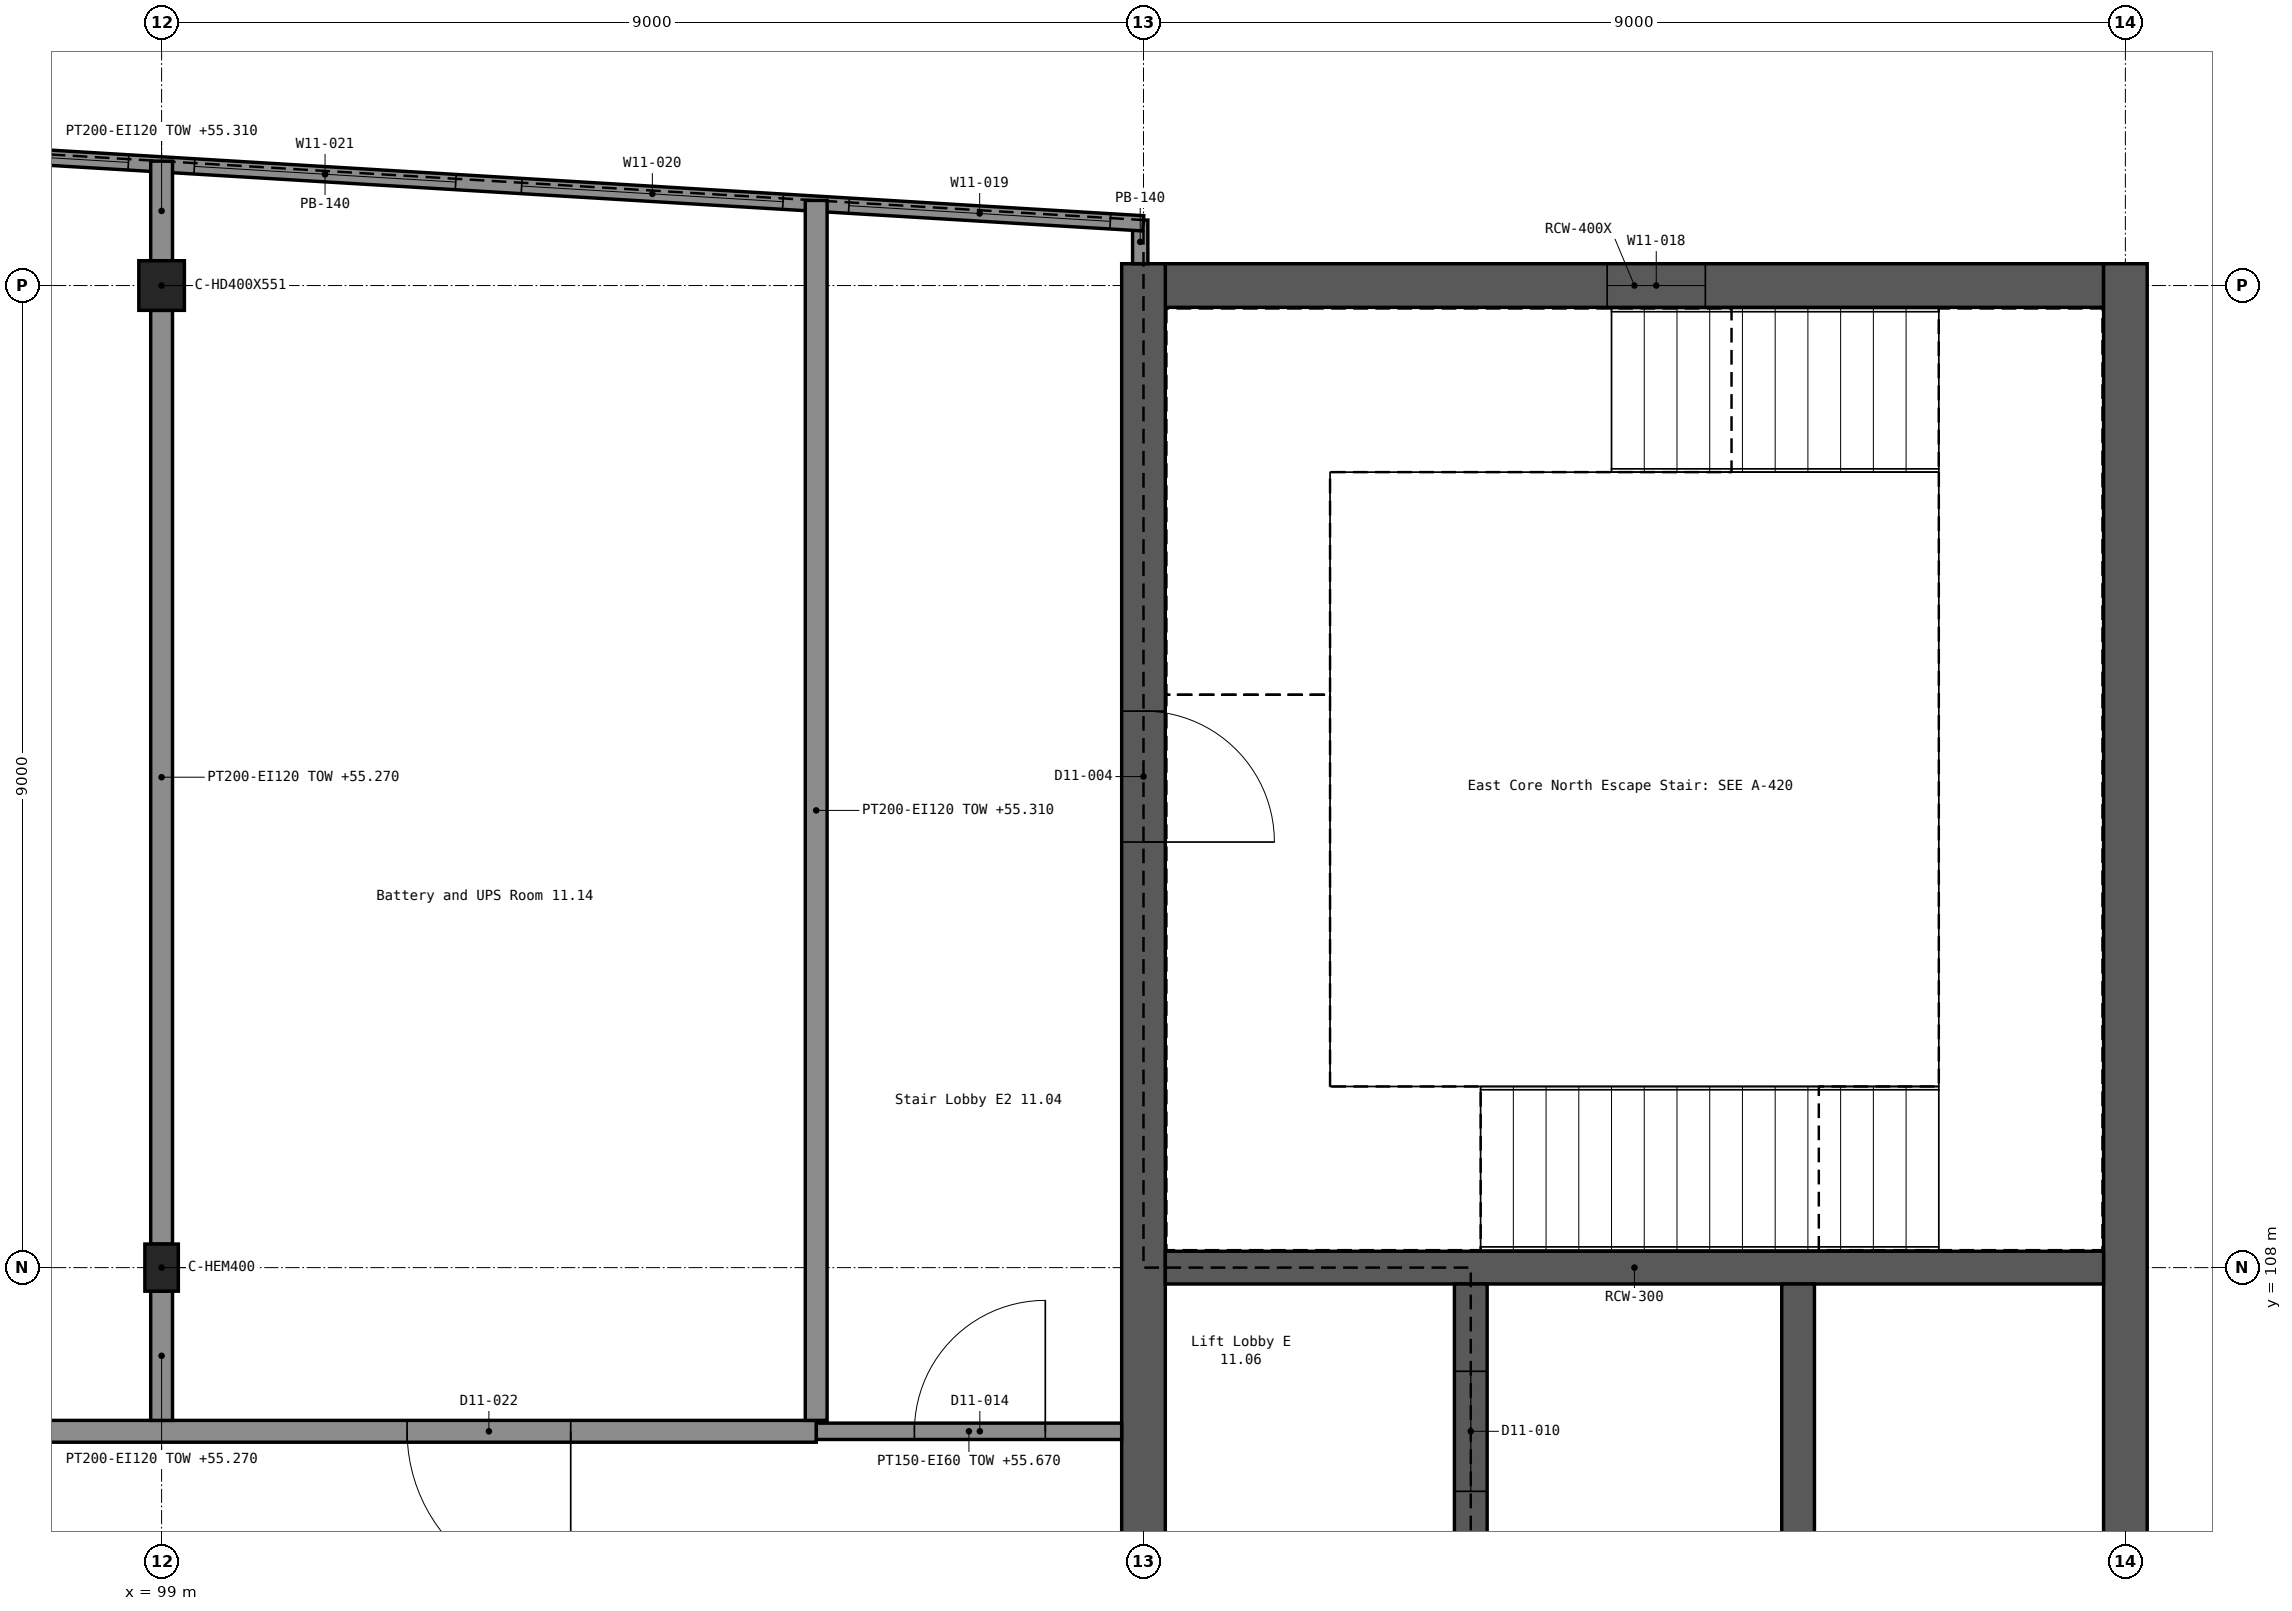
"""IFC4 building model, lengths in metres.
Left out: names, types, materials, properties, quantities, classifications, styles, units other than length and angle.
Written with IfcOpenShell. Run it as: python <this file> out.ifc"""

import sys

from ifc_helpers import new_model, si_unit, direction, frame, frame_2d, origin, origin_2d, place, context, subcontext, project, spatial, rectangle, i_section, extrude, element, fill, save


model = new_model("IFC4")
c1 = context("Model", 3, precision=1e-05, world=origin(), true_north=direction((0.0, 1.0)))
c2 = subcontext(c1, "Body", "Model", "MODEL_VIEW")
j1 = project(units=[si_unit("LENGTHUNIT", "METRE"), si_unit("PLANEANGLEUNIT", "RADIAN")], contexts=[c1])
p1 = place(None, origin())
s1 = spatial("IfcSite", under=j1, at=p1, CompositionType="ELEMENT")
p2 = place(p1, origin())
s2 = spatial("IfcBuilding", under=s1, at=p2, CompositionType="ELEMENT")
p3 = place(p2, frame((0.0, 0.0, 51.9)))
s3 = spatial("IfcBuildingStorey", under=s2, at=p3, CompositionType="ELEMENT", Elevation=51.9)
p4 = place(p3, frame((108.2, 117.0, 0.0), z_axis=(0.0, 0.0, 1.0), x_axis=(1.0, 0.0, 0.0)))
e1 = element("IfcWall", 1, at=p4, inside=s3, PredefinedType="SHEAR", context=c2, shape_type="SweptSolid", body=[
    extrude(rectangle(XDim=8.6, YDim=0.4, at=frame_2d((4.3, 0.0))), origin(), (0.0, 0.0, 1.0), 3.9),
])
p5 = place(p4, frame((4.05, 0.0, 1.2)))
e2 = element("IfcOpeningElement", 2, at=p5, cuts=e1, PredefinedType="OPENING", context=c2, shape_type="SweptSolid", body=[
    extrude(rectangle(XDim=0.9, YDim=1.5, at=frame_2d((0.45, 0.75))), frame((0.0, 0.211, 0.0), z_axis=(0.0, -1.0, 0.0), x_axis=(1.0, 0.0, 0.0)), (0.0, 0.0, 1.0), 0.422),
])
p6 = place(p3, frame((108.0, 89.8, 0.0), z_axis=(0.0, 0.0, 1.0), x_axis=(0.0, 1.0, 0.0)))
e3 = element("IfcWall", 3, at=p6, inside=s3, PredefinedType="SHEAR", context=c2, shape_type="SweptSolid", body=[
    extrude(rectangle(XDim=27.4, YDim=0.4, at=frame_2d((13.7, 0.0))), origin(), (0.0, 0.0, 1.0), 3.9),
])
p7 = place(p6, frame((4.1, 0.0, 0.0)))
e4 = element("IfcOpeningElement", 4, at=p7, cuts=e3, PredefinedType="OPENING", context=c2, shape_type="SweptSolid", body=[
    extrude(rectangle(XDim=1.2, YDim=2.1, at=frame_2d((0.6, 1.05))), frame((0.0, 0.211, 0.0), z_axis=(0.0, -1.0, 0.0), x_axis=(1.0, 0.0, 0.0)), (0.0, 0.0, 1.0), 0.422),
])
p8 = place(p6, frame((22.1, 0.0, 0.0)))
e5 = element("IfcOpeningElement", 5, at=p8, cuts=e3, PredefinedType="OPENING", context=c2, shape_type="SweptSolid", body=[
    extrude(rectangle(XDim=1.2, YDim=2.1, at=frame_2d((0.6, 1.05))), frame((0.0, 0.211, 0.0), z_axis=(0.0, -1.0, 0.0), x_axis=(1.0, 0.0, 0.0)), (0.0, 0.0, 1.0), 0.422),
])
p9 = place(p6, frame((12.5, 0.0, 0.0)))
e6 = element("IfcOpeningElement", 6, at=p9, cuts=e3, PredefinedType="OPENING", context=c2, shape_type="SweptSolid", body=[
    extrude(rectangle(XDim=2.0, YDim=2.1, at=frame_2d((1.0, 1.05))), frame((0.0, 0.211, 0.0), z_axis=(0.0, -1.0, 0.0), x_axis=(1.0, 0.0, 0.0)), (0.0, 0.0, 1.0), 0.422),
])
p10 = place(p3, frame((117.0, 89.8, 0.0), z_axis=(0.0, 0.0, 1.0), x_axis=(0.0, 1.0, 0.0)))
e7 = element("IfcWall", 7, at=p10, inside=s3, PredefinedType="SHEAR", context=c2, shape_type="SweptSolid", body=[
    extrude(rectangle(XDim=27.4, YDim=0.4, at=frame_2d((13.7, 0.0))), origin(), (0.0, 0.0, 1.0), 3.9),
])
p11 = place(p3, frame((108.2, 108.0, 0.0), z_axis=(0.0, 0.0, 1.0), x_axis=(1.0, 0.0, 0.0)))
e8 = element("IfcWall", 8, at=p11, inside=s3, PredefinedType="SHEAR", context=c2, shape_type="SweptSolid", body=[
    extrude(rectangle(XDim=8.6, YDim=0.3, at=frame_2d((4.3, 0.0))), origin(), (0.0, 0.0, 1.0), 3.9),
])
p12 = place(p3, frame((111.0, 99.15, 0.0), z_axis=(0.0, 0.0, 1.0), x_axis=(0.0, 1.0, 0.0)))
e9 = element("IfcWall", 9, at=p12, inside=s3, PredefinedType="SHEAR", context=c2, shape_type="SweptSolid", body=[
    extrude(rectangle(XDim=8.7, YDim=0.3, at=frame_2d((4.35, 0.0))), origin(), (0.0, 0.0, 1.0), 3.9),
])
p13 = place(p12, frame((0.8, 0.0, 0.0)))
e10 = element("IfcOpeningElement", 10, at=p13, cuts=e9, PredefinedType="OPENING", context=c2, shape_type="SweptSolid", body=[
    extrude(rectangle(XDim=1.1, YDim=2.1, at=frame_2d((0.55, 1.05))), frame((0.0, 0.161, 0.0), z_axis=(0.0, -1.0, 0.0), x_axis=(1.0, 0.0, 0.0)), (0.0, 0.0, 1.0), 0.322),
])
p14 = place(p12, frame((3.8, 0.0, 0.0)))
e11 = element("IfcOpeningElement", 11, at=p14, cuts=e9, PredefinedType="OPENING", context=c2, shape_type="SweptSolid", body=[
    extrude(rectangle(XDim=1.1, YDim=2.1, at=frame_2d((0.55, 1.05))), frame((0.0, 0.161, 0.0), z_axis=(0.0, -1.0, 0.0), x_axis=(1.0, 0.0, 0.0)), (0.0, 0.0, 1.0), 0.322),
])
p15 = place(p12, frame((6.8, 0.0, 0.0)))
e12 = element("IfcOpeningElement", 12, at=p15, cuts=e9, PredefinedType="OPENING", context=c2, shape_type="SweptSolid", body=[
    extrude(rectangle(XDim=1.1, YDim=2.1, at=frame_2d((0.55, 1.05))), frame((0.0, 0.161, 0.0), z_axis=(0.0, -1.0, 0.0), x_axis=(1.0, 0.0, 0.0)), (0.0, 0.0, 1.0), 0.322),
])
p16 = place(p3, frame((114.0, 99.15, 0.0), z_axis=(0.0, 0.0, 1.0), x_axis=(0.0, 1.0, 0.0)))
e13 = element("IfcWall", 13, at=p16, inside=s3, PredefinedType="SHEAR", context=c2, shape_type="SweptSolid", body=[
    extrude(rectangle(XDim=8.7, YDim=0.3, at=frame_2d((4.35, 0.0))), origin(), (0.0, 0.0, 1.0), 3.9),
])
p17 = place(p3, frame((99.0, 108.0, 0.0), z_axis=(0.0, 0.0, 1.0), x_axis=(1.0, 0.0, 0.0)))
e14 = element("IfcColumn", 14, at=p17, inside=s3, PredefinedType="COLUMN", context=c2, shape_type="SweptSolid", body=[
    extrude(i_section(OverallWidth=0.307, OverallDepth=0.432, WebThickness=0.021, FlangeThickness=0.04, FilletRadius=0.027, at=origin_2d()), origin(), (0.0, 0.0, 1.0), 3.9),
])
p18 = place(p3, frame((99.0, 117.0, 0.0), z_axis=(0.0, 0.0, 1.0), x_axis=(1.0, 0.0, 0.0)))
e15 = element("IfcColumn", 15, at=p18, inside=s3, PredefinedType="COLUMN", context=c2, shape_type="SweptSolid", body=[
    extrude(i_section(OverallWidth=0.418, OverallDepth=0.455, WebThickness=0.042, FlangeThickness=0.068, FilletRadius=0.015, at=origin_2d()), origin(), (0.0, 0.0, 1.0), 3.9),
])
p19 = place(p3, frame((107.97, 117.2, 0.0), z_axis=(0.0, 0.0, 1.0), x_axis=(0.0, 1.0, 0.0)))
e16 = element("IfcWall", 16, at=p19, inside=s3, PredefinedType="SOLIDWALL", context=c2, shape_type="SweptSolid", body=[
    extrude(rectangle(XDim=0.4, YDim=0.14, at=frame_2d((0.2, 0.0))), origin(), (0.0, 0.0, 1.0), 3.9),
])
p20 = place(p3, frame((107.998, 117.57, 0.0), z_axis=(0.0, 0.0, 1.0), x_axis=(-0.99820523397, 0.059885815306, 0.0)))
e17 = element("IfcWall", 17, at=p20, inside=s3, PredefinedType="SOLIDWALL", context=c2, shape_type="SweptSolid", body=[
    extrude(rectangle(XDim=15.027, YDim=0.14, at=frame_2d((7.513, 0.0))), origin(), (0.0, 0.0, 1.0), 3.9),
])
p21 = place(p20, frame((0.303, 0.0, 0.6)))
e18 = element("IfcOpeningElement", 18, at=p21, cuts=e17, PredefinedType="OPENING", context=c2, shape_type="SweptSolid", body=[
    extrude(rectangle(XDim=2.4, YDim=2.4, at=frame_2d((1.2, 1.2))), frame((0.0, 0.081, 0.0), z_axis=(0.0, -1.0, 0.0), x_axis=(1.0, 0.0, 0.0)), (0.0, 0.0, 1.0), 0.162),
])
p22 = place(p20, frame((3.308, 0.0, 0.6)))
e19 = element("IfcOpeningElement", 19, at=p22, cuts=e17, PredefinedType="OPENING", context=c2, shape_type="SweptSolid", body=[
    extrude(rectangle(XDim=2.4, YDim=2.4, at=frame_2d((1.2, 1.2))), frame((0.0, 0.081, 0.0), z_axis=(0.0, -1.0, 0.0), x_axis=(1.0, 0.0, 0.0)), (0.0, 0.0, 1.0), 0.162),
])
p23 = place(p20, frame((6.313, 0.0, 0.6)))
e20 = element("IfcOpeningElement", 20, at=p23, cuts=e17, PredefinedType="OPENING", context=c2, shape_type="SweptSolid", body=[
    extrude(rectangle(XDim=2.4, YDim=2.4, at=frame_2d((1.2, 1.2))), frame((0.0, 0.081, 0.0), z_axis=(0.0, -1.0, 0.0), x_axis=(1.0, 0.0, 0.0)), (0.0, 0.0, 1.0), 0.162),
])
p24 = place(p20, frame((9.319, 0.0, 0.6)))
e21 = element("IfcOpeningElement", 21, at=p24, cuts=e17, PredefinedType="OPENING", context=c2, shape_type="SweptSolid", body=[
    extrude(rectangle(XDim=2.4, YDim=2.4, at=frame_2d((1.2, 1.2))), frame((0.0, 0.081, 0.0), z_axis=(0.0, -1.0, 0.0), x_axis=(1.0, 0.0, 0.0)), (0.0, 0.0, 1.0), 0.162),
])
p25 = place(p20, frame((12.324, 0.0, 0.6)))
e22 = element("IfcOpeningElement", 22, at=p25, cuts=e17, PredefinedType="OPENING", context=c2, shape_type="SweptSolid", body=[
    extrude(rectangle(XDim=2.4, YDim=2.4, at=frame_2d((1.2, 1.2))), frame((0.0, 0.081, 0.0), z_axis=(0.0, -1.0, 0.0), x_axis=(1.0, 0.0, 0.0)), (0.0, 0.0, 1.0), 0.162),
])
p26 = place(p3, frame((105.0, 106.5, 0.0), z_axis=(0.0, 0.0, 1.0), x_axis=(1.0, 0.0, 0.0)))
e23 = element("IfcWall", 23, at=p26, inside=s3, PredefinedType="PARTITIONING", context=c2, shape_type="SweptSolid", body=[
    extrude(rectangle(XDim=2.8, YDim=0.15, at=frame_2d((1.4, 0.0))), origin(), (0.0, 0.0, 1.0), 3.77),
])
p27 = place(p26, frame((0.9, 0.0, 0.0)))
e24 = element("IfcOpeningElement", 24, at=p27, cuts=e23, PredefinedType="OPENING", context=c2, shape_type="SweptSolid", body=[
    extrude(rectangle(XDim=1.2, YDim=2.1, at=frame_2d((0.6, 1.05))), frame((0.0, 0.086, 0.0), z_axis=(0.0, -1.0, 0.0), x_axis=(1.0, 0.0, 0.0)), (0.0, 0.0, 1.0), 0.172),
])
p28 = place(p3, frame((66.0, 106.5, 0.0), z_axis=(0.0, 0.0, 1.0), x_axis=(1.0, 0.0, 0.0)))
e25 = element("IfcWall", 25, at=p28, inside=s3, PredefinedType="PARTITIONING", context=c2, shape_type="SweptSolid", body=[
    extrude(rectangle(XDim=39.0, YDim=0.2, at=frame_2d((19.5, 0.0))), origin(), (0.0, 0.0, 1.0), 3.77),
])
p29 = place(p28, frame((2.25, 0.0, 0.0)))
e26 = element("IfcOpeningElement", 26, at=p29, cuts=e25, PredefinedType="OPENING", context=c2, shape_type="SweptSolid", body=[
    extrude(rectangle(XDim=1.5, YDim=2.4, at=frame_2d((0.75, 1.2))), frame((0.0, 0.111, 0.0), z_axis=(0.0, -1.0, 0.0), x_axis=(1.0, 0.0, 0.0)), (0.0, 0.0, 1.0), 0.222),
])
p30 = place(p28, frame((9.75, 0.0, 0.0)))
e27 = element("IfcOpeningElement", 27, at=p30, cuts=e25, PredefinedType="OPENING", context=c2, shape_type="SweptSolid", body=[
    extrude(rectangle(XDim=1.5, YDim=2.4, at=frame_2d((0.75, 1.2))), frame((0.0, 0.111, 0.0), z_axis=(0.0, -1.0, 0.0), x_axis=(1.0, 0.0, 0.0)), (0.0, 0.0, 1.0), 0.222),
])
p31 = place(p28, frame((24.375, 0.0, 0.0)))
e28 = element("IfcOpeningElement", 28, at=p31, cuts=e25, PredefinedType="OPENING", context=c2, shape_type="SweptSolid", body=[
    extrude(rectangle(XDim=1.5, YDim=2.4, at=frame_2d((0.75, 1.2))), frame((0.0, 0.111, 0.0), z_axis=(0.0, -1.0, 0.0), x_axis=(1.0, 0.0, 0.0)), (0.0, 0.0, 1.0), 0.222),
])
p32 = place(p28, frame((35.25, 0.0, 0.0)))
e29 = element("IfcOpeningElement", 29, at=p32, cuts=e25, PredefinedType="OPENING", context=c2, shape_type="SweptSolid", body=[
    extrude(rectangle(XDim=1.5, YDim=2.4, at=frame_2d((0.75, 1.2))), frame((0.0, 0.111, 0.0), z_axis=(0.0, -1.0, 0.0), x_axis=(1.0, 0.0, 0.0)), (0.0, 0.0, 1.0), 0.222),
])
p33 = place(p3, frame((99.0, 106.6, 0.0), z_axis=(0.0, 0.0, 1.0), x_axis=(0.0, 1.0, 0.0)))
e30 = element("IfcWall", 30, at=p33, inside=s3, PredefinedType="PARTITIONING", context=c2, shape_type="SweptSolid", body=[
    extrude(rectangle(XDim=1.184, YDim=0.2, at=frame_2d((0.592, 0.0))), origin(), (0.0, 0.0, 1.0), 3.37),
])
p34 = place(p3, frame((99.0, 108.216, 0.0), z_axis=(0.0, 0.0, 1.0), x_axis=(0.0, 1.0, 0.0)))
e31 = element("IfcWall", 31, at=p34, inside=s3, PredefinedType="PARTITIONING", context=c2, shape_type="SweptSolid", body=[
    extrude(rectangle(XDim=8.556, YDim=0.2, at=frame_2d((4.278, 0.0))), origin(), (0.0, 0.0, 1.0), 3.37),
])
p35 = place(p3, frame((99.0, 117.228, 0.0), z_axis=(0.0, 0.0, 1.0), x_axis=(0.0, 1.0, 0.0)))
e32 = element("IfcWall", 32, at=p35, inside=s3, PredefinedType="PARTITIONING", context=c2, shape_type="SweptSolid", body=[
    extrude(rectangle(XDim=0.912, YDim=0.2, at=frame_2d((0.456, 0.0))), origin(), (0.0, 0.0, 1.0), 3.41),
])
p36 = place(p3, frame((105.0, 106.6, 0.0), z_axis=(0.0, 0.0, 1.0), x_axis=(0.0, 1.0, 0.0)))
e33 = element("IfcWall", 33, at=p36, inside=s3, PredefinedType="PARTITIONING", context=c2, shape_type="SweptSolid", body=[
    extrude(rectangle(XDim=11.18, YDim=0.2, at=frame_2d((5.59, 0.0))), origin(), (0.0, 0.0, 1.0), 3.41),
])
p37 = place(p5, origin())
e34 = element("IfcWindow", 34, at=p37, inside=s3, PartitioningType="SINGLE_PANEL", PredefinedType="WINDOW", context=c2, shape_type="SweptSolid", body=[
    extrude(rectangle(XDim=0.9, YDim=1.5, at=frame_2d((0.45, 0.75))), frame((0.0, 0.03, 0.0), z_axis=(0.0, -1.0, 0.0), x_axis=(1.0, 0.0, 0.0)), (0.0, 0.0, 1.0), 0.06),
])
fill(e2, e34)
p38 = place(p21, origin())
e35 = element("IfcWindow", 35, at=p38, inside=s3, PartitioningType="SINGLE_PANEL", PredefinedType="WINDOW", context=c2, shape_type="SweptSolid", body=[
    extrude(rectangle(XDim=2.4, YDim=2.4, at=frame_2d((1.2, 1.2))), frame((0.0, 0.03, 0.0), z_axis=(0.0, -1.0, 0.0), x_axis=(1.0, 0.0, 0.0)), (0.0, 0.0, 1.0), 0.06),
])
fill(e18, e35)
p39 = place(p22, origin())
e36 = element("IfcWindow", 36, at=p39, inside=s3, PartitioningType="SINGLE_PANEL", PredefinedType="WINDOW", context=c2, shape_type="SweptSolid", body=[
    extrude(rectangle(XDim=2.4, YDim=2.4, at=frame_2d((1.2, 1.2))), frame((0.0, 0.03, 0.0), z_axis=(0.0, -1.0, 0.0), x_axis=(1.0, 0.0, 0.0)), (0.0, 0.0, 1.0), 0.06),
])
fill(e19, e36)
p40 = place(p23, origin())
e37 = element("IfcWindow", 37, at=p40, inside=s3, PartitioningType="SINGLE_PANEL", PredefinedType="WINDOW", context=c2, shape_type="SweptSolid", body=[
    extrude(rectangle(XDim=2.4, YDim=2.4, at=frame_2d((1.2, 1.2))), frame((0.0, 0.03, 0.0), z_axis=(0.0, -1.0, 0.0), x_axis=(1.0, 0.0, 0.0)), (0.0, 0.0, 1.0), 0.06),
])
fill(e20, e37)
p41 = place(p24, origin())
e38 = element("IfcWindow", 38, at=p41, inside=s3, PartitioningType="SINGLE_PANEL", PredefinedType="WINDOW", context=c2, shape_type="SweptSolid", body=[
    extrude(rectangle(XDim=2.4, YDim=2.4, at=frame_2d((1.2, 1.2))), frame((0.0, 0.03, 0.0), z_axis=(0.0, -1.0, 0.0), x_axis=(1.0, 0.0, 0.0)), (0.0, 0.0, 1.0), 0.06),
])
fill(e21, e38)
p42 = place(p8, frame((1.2, 0.0, 0.0), z_axis=(0.0, 0.0, 1.0), x_axis=(-1.0, 0.0, 0.0)))
e39 = element("IfcDoor", 39, at=p42, inside=s3, OperationType="SINGLE_SWING_RIGHT", PredefinedType="DOOR", context=c2, shape_type="SweptSolid", body=[
    extrude(rectangle(XDim=1.2, YDim=2.1, at=frame_2d((0.6, 1.05))), frame((0.0, 0.025, 0.0), z_axis=(0.0, -1.0, 0.0), x_axis=(1.0, 0.0, 0.0)), (0.0, 0.0, 1.0), 0.05),
])
fill(e5, e39)
p43 = place(p15, origin())
e40 = element("IfcDoor", 40, at=p43, inside=s3, OperationType="DOUBLE_DOOR_SLIDING", PredefinedType="DOOR", context=c2, shape_type="SweptSolid", body=[
    extrude(rectangle(XDim=1.1, YDim=2.1, at=frame_2d((0.55, 1.05))), frame((0.0, 0.025, 0.0), z_axis=(0.0, -1.0, 0.0), x_axis=(1.0, 0.0, 0.0)), (0.0, 0.0, 1.0), 0.05),
])
fill(e12, e40)
p44 = place(p27, origin())
e41 = element("IfcDoor", 41, at=p44, inside=s3, OperationType="SINGLE_SWING_RIGHT", PredefinedType="DOOR", context=c2, shape_type="SweptSolid", body=[
    extrude(rectangle(XDim=1.2, YDim=2.1, at=frame_2d((0.6, 1.05))), frame((0.0, 0.025, 0.0), z_axis=(0.0, -1.0, 0.0), x_axis=(1.0, 0.0, 0.0)), (0.0, 0.0, 1.0), 0.05),
])
fill(e24, e41)
p45 = place(p32, frame((1.5, 0.0, 0.0), z_axis=(0.0, 0.0, 1.0), x_axis=(-1.0, 0.0, 0.0)))
e42 = element("IfcDoor", 42, at=p45, inside=s3, OperationType="DOUBLE_DOOR_SINGLE_SWING", PredefinedType="DOOR", context=c2, shape_type="SweptSolid", body=[
    extrude(rectangle(XDim=1.5, YDim=2.4, at=frame_2d((0.75, 1.2))), frame((0.0, 0.025, 0.0), z_axis=(0.0, -1.0, 0.0), x_axis=(1.0, 0.0, 0.0)), (0.0, 0.0, 1.0), 0.05),
])
fill(e29, e42)
save(model, sys.argv[1])
